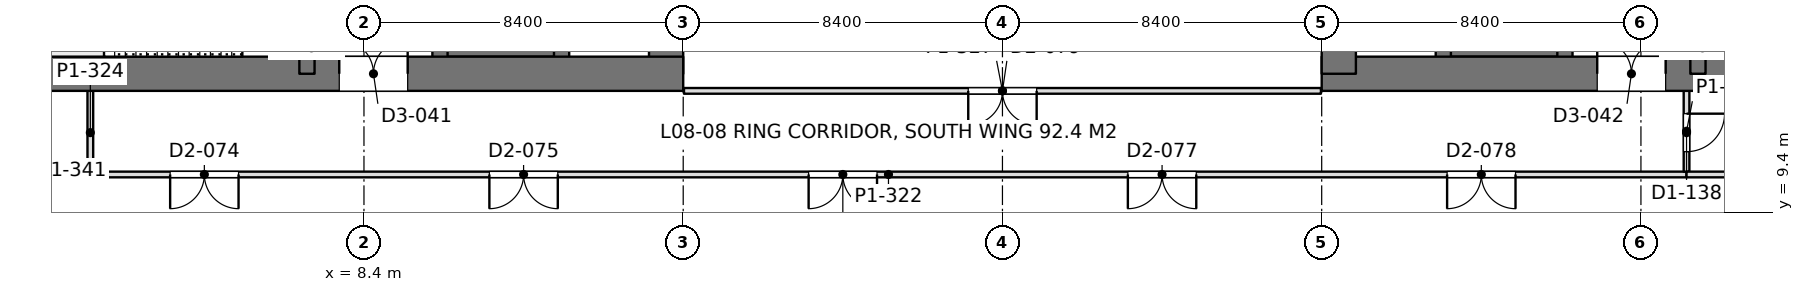
"""IFC4 building model, lengths in metres.
Left out: names, types, materials, properties, quantities, classifications, styles, units other than length and angle.
Written with IfcOpenShell. Run it as: python <this file> out.ifc"""

import sys

from ifc_helpers import new_model, si_unit, direction, frame, frame_2d, origin, place, context, subcontext, project, spatial, rectangle, extrude, element, fill, save


model = new_model("IFC4")
c1 = context("Model", 3, precision=1e-05, world=origin(), true_north=direction((0.0, 1.0)))
c2 = subcontext(c1, "Body", "Model", "MODEL_VIEW")
j1 = project(units=[si_unit("LENGTHUNIT", "METRE"), si_unit("PLANEANGLEUNIT", "RADIAN")], contexts=[c1])
p1 = place(None, origin())
s1 = spatial("IfcSite", under=j1, at=p1, CompositionType="ELEMENT")
p2 = place(p1, origin())
s2 = spatial("IfcBuilding", under=s1, at=p2, CompositionType="ELEMENT")
p3 = place(p2, frame((0.0, 0.0, 36.9)))
s3 = spatial("IfcBuildingStorey", under=s2, at=p3, CompositionType="ELEMENT", Elevation=36.9)
p4 = place(p3, frame((-1.2, 13.05, 0.0), z_axis=(0.0, 0.0, 1.0), x_axis=(1.0, 0.0, 0.0)))
e1 = element("IfcWall", 1, at=p4, inside=s3, PredefinedType="SHEAR", context=c2, shape_type="SweptSolid", body=[
    extrude(rectangle(XDim=18.0, YDim=0.9, at=frame_2d((9.0, 0.0))), origin(), (0.0, 0.0, 1.0), 4.5),
])
p5 = place(p4, frame((8.95, 0.0, 0.0)))
e2 = element("IfcOpeningElement", 2, at=p5, cuts=e1, PredefinedType="OPENING", context=c2, shape_type="SweptSolid", body=[
    extrude(rectangle(XDim=1.8, YDim=2.4, at=frame_2d((0.9, 1.2))), frame((0.0, 0.46, 0.0), z_axis=(0.0, -1.0, 0.0), x_axis=(1.0, 0.0, 0.0)), (0.0, 0.0, 1.0), 0.92),
])
p6 = place(p3, frame((16.35, 13.05, 0.0), z_axis=(0.0, 0.0, 1.0), x_axis=(0.0, 1.0, 0.0)))
e3 = element("IfcWall", 3, at=p6, inside=s3, PredefinedType="SHEAR", context=c2, shape_type="SweptSolid", body=[
    extrude(rectangle(XDim=24.3, YDim=0.9, at=frame_2d((12.15, 0.0))), origin(), (0.0, 0.0, 1.0), 4.5),
])
p7 = place(p3, frame((6.9, 13.05, 0.0), z_axis=(0.0, 0.0, 1.0), x_axis=(0.0, 1.0, 0.0)))
e4 = element("IfcWall", 4, at=p7, inside=s3, PredefinedType="SHEAR", context=c2, shape_type="SweptSolid", body=[
    extrude(rectangle(XDim=24.3, YDim=0.4, at=frame_2d((12.15, 0.0))), origin(), (0.0, 0.0, 1.0), 4.5),
])
p8 = place(p7, frame((1.3, 0.0, 0.0)))
e5 = element("IfcOpeningElement", 5, at=p8, cuts=e4, PredefinedType="OPENING", context=c2, shape_type="SweptSolid", body=[
    extrude(rectangle(XDim=1.0, YDim=2.2, at=frame_2d((0.5, 1.1))), frame((0.0, 0.21, 0.0), z_axis=(0.0, -1.0, 0.0), x_axis=(1.0, 0.0, 0.0)), (0.0, 0.0, 1.0), 0.42),
])
p9 = place(p7, frame((22.0, 0.0, 0.0)))
e6 = element("IfcOpeningElement", 6, at=p9, cuts=e4, PredefinedType="OPENING", context=c2, shape_type="SweptSolid", body=[
    extrude(rectangle(XDim=1.0, YDim=2.2, at=frame_2d((0.5, 1.1))), frame((0.0, 0.21, 0.0), z_axis=(0.0, -1.0, 0.0), x_axis=(1.0, 0.0, 0.0)), (0.0, 0.0, 1.0), 0.42),
])
p10 = place(p7, frame((5.55, 0.0, 0.0)))
e7 = element("IfcOpeningElement", 7, at=p10, cuts=e4, PredefinedType="OPENING", context=c2, shape_type="SweptSolid", body=[
    extrude(rectangle(XDim=1.0, YDim=2.2, at=frame_2d((0.5, 1.1))), frame((0.0, 0.21, 0.0), z_axis=(0.0, -1.0, 0.0), x_axis=(1.0, 0.0, 0.0)), (0.0, 0.0, 1.0), 0.42),
])
p11 = place(p7, frame((9.55, 0.0, 0.0)))
e8 = element("IfcOpeningElement", 8, at=p11, cuts=e4, PredefinedType="OPENING", context=c2, shape_type="SweptSolid", body=[
    extrude(rectangle(XDim=1.0, YDim=2.2, at=frame_2d((0.5, 1.1))), frame((0.0, 0.21, 0.0), z_axis=(0.0, -1.0, 0.0), x_axis=(1.0, 0.0, 0.0)), (0.0, 0.0, 1.0), 0.42),
])
p12 = place(p7, frame((12.8, 0.0, 0.0)))
e9 = element("IfcOpeningElement", 9, at=p12, cuts=e4, PredefinedType="OPENING", context=c2, shape_type="SweptSolid", body=[
    extrude(rectangle(XDim=1.1, YDim=2.2, at=frame_2d((0.55, 1.1))), frame((0.0, 0.21, 0.0), z_axis=(0.0, -1.0, 0.0), x_axis=(1.0, 0.0, 0.0)), (0.0, 0.0, 1.0), 0.42),
])
p13 = place(p7, frame((15.538, 0.0, 0.0)))
e10 = element("IfcOpeningElement", 10, at=p13, cuts=e4, PredefinedType="OPENING", context=c2, shape_type="SweptSolid", body=[
    extrude(rectangle(XDim=1.1, YDim=2.2, at=frame_2d((0.55, 1.1))), frame((0.0, 0.21, 0.0), z_axis=(0.0, -1.0, 0.0), x_axis=(1.0, 0.0, 0.0)), (0.0, 0.0, 1.0), 0.42),
])
p14 = place(p7, frame((18.262, 0.0, 0.0)))
e11 = element("IfcOpeningElement", 11, at=p14, cuts=e4, PredefinedType="OPENING", context=c2, shape_type="SweptSolid", body=[
    extrude(rectangle(XDim=1.1, YDim=2.2, at=frame_2d((0.55, 1.1))), frame((0.0, 0.21, 0.0), z_axis=(0.0, -1.0, 0.0), x_axis=(1.0, 0.0, 0.0)), (0.0, 0.0, 1.0), 0.42),
])
p15 = place(p3, frame((10.4, 13.05, 0.0), z_axis=(0.0, 0.0, 1.0), x_axis=(0.0, 1.0, 0.0)))
e12 = element("IfcWall", 12, at=p15, inside=s3, PredefinedType="SHEAR", context=c2, shape_type="SweptSolid", body=[
    extrude(rectangle(XDim=24.3, YDim=0.4, at=frame_2d((12.15, 0.0))), origin(), (0.0, 0.0, 1.0), 4.5),
])
p16 = place(p15, frame((1.5, 0.0, 0.0)))
e13 = element("IfcOpeningElement", 13, at=p16, cuts=e12, PredefinedType="OPENING", context=c2, shape_type="SweptSolid", body=[
    extrude(rectangle(XDim=1.1, YDim=2.2, at=frame_2d((0.55, 1.1))), frame((0.0, 0.21, 0.0), z_axis=(0.0, -1.0, 0.0), x_axis=(1.0, 0.0, 0.0)), (0.0, 0.0, 1.0), 0.42),
])
p17 = place(p15, frame((4.35, 0.0, 0.0)))
e14 = element("IfcOpeningElement", 14, at=p17, cuts=e12, PredefinedType="OPENING", context=c2, shape_type="SweptSolid", body=[
    extrude(rectangle(XDim=1.1, YDim=2.2, at=frame_2d((0.55, 1.1))), frame((0.0, 0.21, 0.0), z_axis=(0.0, -1.0, 0.0), x_axis=(1.0, 0.0, 0.0)), (0.0, 0.0, 1.0), 0.42),
])
p18 = place(p15, frame((7.2, 0.0, 0.0)))
e15 = element("IfcOpeningElement", 15, at=p18, cuts=e12, PredefinedType="OPENING", context=c2, shape_type="SweptSolid", body=[
    extrude(rectangle(XDim=1.1, YDim=2.2, at=frame_2d((0.55, 1.1))), frame((0.0, 0.21, 0.0), z_axis=(0.0, -1.0, 0.0), x_axis=(1.0, 0.0, 0.0)), (0.0, 0.0, 1.0), 0.42),
])
p19 = place(p15, frame((21.45, 0.0, 0.0)))
e16 = element("IfcOpeningElement", 16, at=p19, cuts=e12, PredefinedType="OPENING", context=c2, shape_type="SweptSolid", body=[
    extrude(rectangle(XDim=1.1, YDim=2.2, at=frame_2d((0.55, 1.1))), frame((0.0, 0.21, 0.0), z_axis=(0.0, -1.0, 0.0), x_axis=(1.0, 0.0, 0.0)), (0.0, 0.0, 1.0), 0.42),
])
p20 = place(p3, frame((13.6, 13.05, 0.0), z_axis=(0.0, 0.0, 1.0), x_axis=(0.0, 1.0, 0.0)))
e17 = element("IfcWall", 17, at=p20, inside=s3, PredefinedType="SHEAR", context=c2, shape_type="SweptSolid", body=[
    extrude(rectangle(XDim=24.3, YDim=0.4, at=frame_2d((12.15, 0.0))), origin(), (0.0, 0.0, 1.0), 4.5),
])
p21 = place(p3, frame((10.4, 13.65, 0.0), z_axis=(0.0, 0.0, 1.0), x_axis=(1.0, 0.0, 0.0)))
e18 = element("IfcWall", 18, at=p21, inside=s3, PredefinedType="SHEAR", context=c2, shape_type="SweptSolid", body=[
    extrude(rectangle(XDim=3.2, YDim=0.3, at=frame_2d((1.6, 0.0))), origin(), (0.0, 0.0, 1.0), 4.5),
])
p22 = place(p3, frame((33.6, 13.05, 0.0), z_axis=(0.0, 0.0, 1.0), x_axis=(1.0, 0.0, 0.0)))
e19 = element("IfcWall", 19, at=p22, inside=s3, PredefinedType="SHEAR", context=c2, shape_type="SweptSolid", body=[
    extrude(rectangle(XDim=18.0, YDim=0.9, at=frame_2d((9.0, 0.0))), origin(), (0.0, 0.0, 1.0), 4.5),
])
p23 = place(p22, frame((7.25, 0.0, 0.0)))
e20 = element("IfcOpeningElement", 20, at=p23, cuts=e19, PredefinedType="OPENING", context=c2, shape_type="SweptSolid", body=[
    extrude(rectangle(XDim=1.8, YDim=2.4, at=frame_2d((0.9, 1.2))), frame((0.0, 0.46, 0.0), z_axis=(0.0, -1.0, 0.0), x_axis=(1.0, 0.0, 0.0)), (0.0, 0.0, 1.0), 0.92),
])
p24 = place(p3, frame((34.05, 13.05, 0.0), z_axis=(0.0, 0.0, 1.0), x_axis=(0.0, 1.0, 0.0)))
e21 = element("IfcWall", 21, at=p24, inside=s3, PredefinedType="SHEAR", context=c2, shape_type="SweptSolid", body=[
    extrude(rectangle(XDim=24.3, YDim=0.9, at=frame_2d((12.15, 0.0))), origin(), (0.0, 0.0, 1.0), 4.5),
])
p25 = place(p3, frame((43.5, 13.05, 0.0), z_axis=(0.0, 0.0, 1.0), x_axis=(0.0, 1.0, 0.0)))
e22 = element("IfcWall", 22, at=p25, inside=s3, PredefinedType="SHEAR", context=c2, shape_type="SweptSolid", body=[
    extrude(rectangle(XDim=24.3, YDim=0.4, at=frame_2d((12.15, 0.0))), origin(), (0.0, 0.0, 1.0), 4.5),
])
p26 = place(p25, frame((1.3, 0.0, 0.0)))
e23 = element("IfcOpeningElement", 23, at=p26, cuts=e22, PredefinedType="OPENING", context=c2, shape_type="SweptSolid", body=[
    extrude(rectangle(XDim=1.0, YDim=2.2, at=frame_2d((0.5, 1.1))), frame((0.0, 0.21, 0.0), z_axis=(0.0, -1.0, 0.0), x_axis=(1.0, 0.0, 0.0)), (0.0, 0.0, 1.0), 0.42),
])
p27 = place(p25, frame((22.0, 0.0, 0.0)))
e24 = element("IfcOpeningElement", 24, at=p27, cuts=e22, PredefinedType="OPENING", context=c2, shape_type="SweptSolid", body=[
    extrude(rectangle(XDim=1.0, YDim=2.2, at=frame_2d((0.5, 1.1))), frame((0.0, 0.21, 0.0), z_axis=(0.0, -1.0, 0.0), x_axis=(1.0, 0.0, 0.0)), (0.0, 0.0, 1.0), 0.42),
])
p28 = place(p25, frame((5.55, 0.0, 0.0)))
e25 = element("IfcOpeningElement", 25, at=p28, cuts=e22, PredefinedType="OPENING", context=c2, shape_type="SweptSolid", body=[
    extrude(rectangle(XDim=1.0, YDim=2.2, at=frame_2d((0.5, 1.1))), frame((0.0, 0.21, 0.0), z_axis=(0.0, -1.0, 0.0), x_axis=(1.0, 0.0, 0.0)), (0.0, 0.0, 1.0), 0.42),
])
p29 = place(p25, frame((9.55, 0.0, 0.0)))
e26 = element("IfcOpeningElement", 26, at=p29, cuts=e22, PredefinedType="OPENING", context=c2, shape_type="SweptSolid", body=[
    extrude(rectangle(XDim=1.0, YDim=2.2, at=frame_2d((0.5, 1.1))), frame((0.0, 0.21, 0.0), z_axis=(0.0, -1.0, 0.0), x_axis=(1.0, 0.0, 0.0)), (0.0, 0.0, 1.0), 0.42),
])
p30 = place(p25, frame((12.8, 0.0, 0.0)))
e27 = element("IfcOpeningElement", 27, at=p30, cuts=e22, PredefinedType="OPENING", context=c2, shape_type="SweptSolid", body=[
    extrude(rectangle(XDim=1.1, YDim=2.2, at=frame_2d((0.55, 1.1))), frame((0.0, 0.21, 0.0), z_axis=(0.0, -1.0, 0.0), x_axis=(1.0, 0.0, 0.0)), (0.0, 0.0, 1.0), 0.42),
])
p31 = place(p25, frame((15.538, 0.0, 0.0)))
e28 = element("IfcOpeningElement", 28, at=p31, cuts=e22, PredefinedType="OPENING", context=c2, shape_type="SweptSolid", body=[
    extrude(rectangle(XDim=1.1, YDim=2.2, at=frame_2d((0.55, 1.1))), frame((0.0, 0.21, 0.0), z_axis=(0.0, -1.0, 0.0), x_axis=(1.0, 0.0, 0.0)), (0.0, 0.0, 1.0), 0.42),
])
p32 = place(p25, frame((18.262, 0.0, 0.0)))
e29 = element("IfcOpeningElement", 29, at=p32, cuts=e22, PredefinedType="OPENING", context=c2, shape_type="SweptSolid", body=[
    extrude(rectangle(XDim=1.1, YDim=2.2, at=frame_2d((0.55, 1.1))), frame((0.0, 0.21, 0.0), z_axis=(0.0, -1.0, 0.0), x_axis=(1.0, 0.0, 0.0)), (0.0, 0.0, 1.0), 0.42),
])
p33 = place(p3, frame((40.0, 13.05, 0.0), z_axis=(0.0, 0.0, 1.0), x_axis=(0.0, 1.0, 0.0)))
e30 = element("IfcWall", 30, at=p33, inside=s3, PredefinedType="SHEAR", context=c2, shape_type="SweptSolid", body=[
    extrude(rectangle(XDim=24.3, YDim=0.4, at=frame_2d((12.15, 0.0))), origin(), (0.0, 0.0, 1.0), 4.5),
])
p34 = place(p33, frame((1.5, 0.0, 0.0)))
e31 = element("IfcOpeningElement", 31, at=p34, cuts=e30, PredefinedType="OPENING", context=c2, shape_type="SweptSolid", body=[
    extrude(rectangle(XDim=1.1, YDim=2.2, at=frame_2d((0.55, 1.1))), frame((0.0, 0.21, 0.0), z_axis=(0.0, -1.0, 0.0), x_axis=(1.0, 0.0, 0.0)), (0.0, 0.0, 1.0), 0.42),
])
p35 = place(p33, frame((4.35, 0.0, 0.0)))
e32 = element("IfcOpeningElement", 32, at=p35, cuts=e30, PredefinedType="OPENING", context=c2, shape_type="SweptSolid", body=[
    extrude(rectangle(XDim=1.1, YDim=2.2, at=frame_2d((0.55, 1.1))), frame((0.0, 0.21, 0.0), z_axis=(0.0, -1.0, 0.0), x_axis=(1.0, 0.0, 0.0)), (0.0, 0.0, 1.0), 0.42),
])
p36 = place(p33, frame((7.2, 0.0, 0.0)))
e33 = element("IfcOpeningElement", 33, at=p36, cuts=e30, PredefinedType="OPENING", context=c2, shape_type="SweptSolid", body=[
    extrude(rectangle(XDim=1.1, YDim=2.2, at=frame_2d((0.55, 1.1))), frame((0.0, 0.21, 0.0), z_axis=(0.0, -1.0, 0.0), x_axis=(1.0, 0.0, 0.0)), (0.0, 0.0, 1.0), 0.42),
])
p37 = place(p33, frame((21.45, 0.0, 0.0)))
e34 = element("IfcOpeningElement", 34, at=p37, cuts=e30, PredefinedType="OPENING", context=c2, shape_type="SweptSolid", body=[
    extrude(rectangle(XDim=1.1, YDim=2.2, at=frame_2d((0.55, 1.1))), frame((0.0, 0.21, 0.0), z_axis=(0.0, -1.0, 0.0), x_axis=(1.0, 0.0, 0.0)), (0.0, 0.0, 1.0), 0.42),
])
p38 = place(p3, frame((36.8, 13.05, 0.0), z_axis=(0.0, 0.0, 1.0), x_axis=(0.0, 1.0, 0.0)))
e35 = element("IfcWall", 35, at=p38, inside=s3, PredefinedType="SHEAR", context=c2, shape_type="SweptSolid", body=[
    extrude(rectangle(XDim=24.3, YDim=0.4, at=frame_2d((12.15, 0.0))), origin(), (0.0, 0.0, 1.0), 4.5),
])
p39 = place(p3, frame((40.0, 13.65, 0.0), z_axis=(0.0, 0.0, 1.0), x_axis=(-1.0, 0.0, 0.0)))
e36 = element("IfcWall", 36, at=p39, inside=s3, PredefinedType="SHEAR", context=c2, shape_type="SweptSolid", body=[
    extrude(rectangle(XDim=3.2, YDim=0.3, at=frame_2d((1.6, 0.0))), origin(), (0.0, 0.0, 1.0), 4.5),
])
p40 = place(p3, frame((1.2, 10.4, 0.0), z_axis=(0.0, 0.0, 1.0), x_axis=(1.0, 0.0, 0.0)))
e37 = element("IfcWall", 37, at=p40, inside=s3, PredefinedType="PARTITIONING", context=c2, shape_type="SweptSolid", body=[
    extrude(rectangle(XDim=42.002, YDim=0.15, at=frame_2d((21.001, 0.0))), origin(), (0.0, 0.0, 1.0), 3.74),
])
p41 = place(p40, frame((2.1, 0.0, 0.0)))
e38 = element("IfcOpeningElement", 38, at=p41, cuts=e37, PredefinedType="OPENING", context=c2, shape_type="SweptSolid", body=[
    extrude(rectangle(XDim=1.8, YDim=2.2, at=frame_2d((0.9, 1.1))), frame((0.0, 0.085, 0.0), z_axis=(0.0, -1.0, 0.0), x_axis=(1.0, 0.0, 0.0)), (0.0, 0.0, 1.0), 0.17),
])
p42 = place(p40, frame((10.5, 0.0, 0.0)))
e39 = element("IfcOpeningElement", 39, at=p42, cuts=e37, PredefinedType="OPENING", context=c2, shape_type="SweptSolid", body=[
    extrude(rectangle(XDim=1.8, YDim=2.2, at=frame_2d((0.9, 1.1))), frame((0.0, 0.085, 0.0), z_axis=(0.0, -1.0, 0.0), x_axis=(1.0, 0.0, 0.0)), (0.0, 0.0, 1.0), 0.17),
])
p43 = place(p40, frame((18.9, 0.0, 0.0)))
e40 = element("IfcOpeningElement", 40, at=p43, cuts=e37, PredefinedType="OPENING", context=c2, shape_type="SweptSolid", body=[
    extrude(rectangle(XDim=1.8, YDim=2.2, at=frame_2d((0.9, 1.1))), frame((0.0, 0.085, 0.0), z_axis=(0.0, -1.0, 0.0), x_axis=(1.0, 0.0, 0.0)), (0.0, 0.0, 1.0), 0.17),
])
p44 = place(p40, frame((27.3, 0.0, 0.0)))
e41 = element("IfcOpeningElement", 41, at=p44, cuts=e37, PredefinedType="OPENING", context=c2, shape_type="SweptSolid", body=[
    extrude(rectangle(XDim=1.8, YDim=2.2, at=frame_2d((0.9, 1.1))), frame((0.0, 0.085, 0.0), z_axis=(0.0, -1.0, 0.0), x_axis=(1.0, 0.0, 0.0)), (0.0, 0.0, 1.0), 0.17),
])
p45 = place(p40, frame((35.7, 0.0, 0.0)))
e42 = element("IfcOpeningElement", 42, at=p45, cuts=e37, PredefinedType="OPENING", context=c2, shape_type="SweptSolid", body=[
    extrude(rectangle(XDim=1.8, YDim=2.2, at=frame_2d((0.9, 1.1))), frame((0.0, 0.085, 0.0), z_axis=(0.0, -1.0, 0.0), x_axis=(1.0, 0.0, 0.0)), (0.0, 0.0, 1.0), 0.17),
])
p46 = place(p3, frame((1.2, 10.4, 0.0), z_axis=(0.0, 0.0, 1.0), x_axis=(0.0, 1.0, 0.0)))
e43 = element("IfcWall", 43, at=p46, inside=s3, PredefinedType="PARTITIONING", context=c2, shape_type="SweptSolid", body=[
    extrude(rectangle(XDim=2.202, YDim=0.15, at=frame_2d((1.101, 0.0))), origin(), (0.0, 0.0, 1.0), 4.34),
])
p47 = place(p3, frame((43.2, 10.474, 0.0), z_axis=(0.0, 0.0, 1.0), x_axis=(0.0, 1.0, 0.0)))
e44 = element("IfcWall", 44, at=p47, inside=s3, PredefinedType="PARTITIONING", context=c2, shape_type="SweptSolid", body=[
    extrude(rectangle(XDim=2.128, YDim=0.15, at=frame_2d((1.064, 0.0))), origin(), (0.0, 0.0, 1.0), 4.34),
])
p48 = place(p47, frame((0.526, 0.0, 0.0)))
e45 = element("IfcOpeningElement", 45, at=p48, cuts=e44, PredefinedType="OPENING", context=c2, shape_type="SweptSolid", body=[
    extrude(rectangle(XDim=1.0, YDim=2.2, at=frame_2d((0.5, 1.1))), frame((0.0, 0.085, 0.0), z_axis=(0.0, -1.0, 0.0), x_axis=(1.0, 0.0, 0.0)), (0.0, 0.0, 1.0), 0.17),
])
p49 = place(p3, frame((43.198, 10.4, 0.0), z_axis=(0.0, 0.0, 1.0), x_axis=(1.0, 0.0, 0.0)))
e46 = element("IfcWall", 46, at=p49, inside=s3, PredefinedType="PARTITIONING", context=c2, shape_type="SweptSolid", body=[
    extrude(rectangle(XDim=6.002, YDim=0.15, at=frame_2d((3.001, 0.0))), origin(), (0.0, 0.0, 1.0), 4.34),
])
p50 = place(p3, frame((16.82, 12.6, 0.0), z_axis=(0.0, 0.0, 1.0), x_axis=(1.0, 0.0, 0.0)))
e47 = element("IfcWall", 47, at=p50, inside=s3, PredefinedType="PARTITIONING", context=c2, shape_type="SweptSolid", body=[
    extrude(rectangle(XDim=16.76, YDim=0.15, at=frame_2d((8.38, 0.0))), origin(), (0.0, 0.0, 1.0), 3.74),
])
p51 = place(p50, frame((7.48, 0.0, 0.0)))
e48 = element("IfcOpeningElement", 48, at=p51, cuts=e47, PredefinedType="OPENING", context=c2, shape_type="SweptSolid", body=[
    extrude(rectangle(XDim=1.8, YDim=2.2, at=frame_2d((0.9, 1.1))), frame((0.0, 0.085, 0.0), z_axis=(0.0, -1.0, 0.0), x_axis=(1.0, 0.0, 0.0)), (0.0, 0.0, 1.0), 0.17),
])
p52 = place(p5, origin())
e49 = element("IfcDoor", 49, at=p52, inside=s3, OperationType="DOUBLE_DOOR_SINGLE_SWING", PredefinedType="DOOR", context=c2, shape_type="SweptSolid", body=[
    extrude(rectangle(XDim=1.8, YDim=2.4, at=frame_2d((0.9, 1.2))), frame((0.0, 0.025, 0.0), z_axis=(0.0, -1.0, 0.0), x_axis=(1.0, 0.0, 0.0)), (0.0, 0.0, 1.0), 0.05),
])
fill(e2, e49)
p53 = place(p23, origin())
e50 = element("IfcDoor", 50, at=p53, inside=s3, OperationType="DOUBLE_DOOR_SINGLE_SWING", PredefinedType="DOOR", context=c2, shape_type="SweptSolid", body=[
    extrude(rectangle(XDim=1.8, YDim=2.4, at=frame_2d((0.9, 1.2))), frame((0.0, 0.025, 0.0), z_axis=(0.0, -1.0, 0.0), x_axis=(1.0, 0.0, 0.0)), (0.0, 0.0, 1.0), 0.05),
])
fill(e20, e50)
p54 = place(p41, frame((1.8, 0.0, 0.0), z_axis=(0.0, 0.0, 1.0), x_axis=(-1.0, 0.0, 0.0)))
e51 = element("IfcDoor", 51, at=p54, inside=s3, OperationType="DOUBLE_DOOR_SINGLE_SWING", PredefinedType="DOOR", context=c2, shape_type="SweptSolid", body=[
    extrude(rectangle(XDim=1.8, YDim=2.2, at=frame_2d((0.9, 1.1))), frame((0.0, 0.025, 0.0), z_axis=(0.0, -1.0, 0.0), x_axis=(1.0, 0.0, 0.0)), (0.0, 0.0, 1.0), 0.05),
])
fill(e38, e51)
p55 = place(p42, frame((1.8, 0.0, 0.0), z_axis=(0.0, 0.0, 1.0), x_axis=(-1.0, 0.0, 0.0)))
e52 = element("IfcDoor", 52, at=p55, inside=s3, OperationType="DOUBLE_DOOR_SINGLE_SWING", PredefinedType="DOOR", context=c2, shape_type="SweptSolid", body=[
    extrude(rectangle(XDim=1.8, YDim=2.2, at=frame_2d((0.9, 1.1))), frame((0.0, 0.025, 0.0), z_axis=(0.0, -1.0, 0.0), x_axis=(1.0, 0.0, 0.0)), (0.0, 0.0, 1.0), 0.05),
])
fill(e39, e52)
p56 = place(p43, frame((1.8, 0.0, 0.0), z_axis=(0.0, 0.0, 1.0), x_axis=(-1.0, 0.0, 0.0)))
e53 = element("IfcDoor", 53, at=p56, inside=s3, OperationType="DOUBLE_DOOR_SINGLE_SWING", PredefinedType="DOOR", context=c2, shape_type="SweptSolid", body=[
    extrude(rectangle(XDim=1.8, YDim=2.2, at=frame_2d((0.9, 1.1))), frame((0.0, 0.025, 0.0), z_axis=(0.0, -1.0, 0.0), x_axis=(1.0, 0.0, 0.0)), (0.0, 0.0, 1.0), 0.05),
])
fill(e40, e53)
p57 = place(p44, frame((1.8, 0.0, 0.0), z_axis=(0.0, 0.0, 1.0), x_axis=(-1.0, 0.0, 0.0)))
e54 = element("IfcDoor", 54, at=p57, inside=s3, OperationType="DOUBLE_DOOR_SINGLE_SWING", PredefinedType="DOOR", context=c2, shape_type="SweptSolid", body=[
    extrude(rectangle(XDim=1.8, YDim=2.2, at=frame_2d((0.9, 1.1))), frame((0.0, 0.025, 0.0), z_axis=(0.0, -1.0, 0.0), x_axis=(1.0, 0.0, 0.0)), (0.0, 0.0, 1.0), 0.05),
])
fill(e41, e54)
p58 = place(p45, frame((1.8, 0.0, 0.0), z_axis=(0.0, 0.0, 1.0), x_axis=(-1.0, 0.0, 0.0)))
e55 = element("IfcDoor", 55, at=p58, inside=s3, OperationType="DOUBLE_DOOR_SINGLE_SWING", PredefinedType="DOOR", context=c2, shape_type="SweptSolid", body=[
    extrude(rectangle(XDim=1.8, YDim=2.2, at=frame_2d((0.9, 1.1))), frame((0.0, 0.025, 0.0), z_axis=(0.0, -1.0, 0.0), x_axis=(1.0, 0.0, 0.0)), (0.0, 0.0, 1.0), 0.05),
])
fill(e42, e55)
p59 = place(p48, frame((1.0, 0.0, 0.0), z_axis=(0.0, 0.0, 1.0), x_axis=(-1.0, 0.0, 0.0)))
e56 = element("IfcDoor", 56, at=p59, inside=s3, OperationType="SINGLE_SWING_LEFT", PredefinedType="DOOR", context=c2, shape_type="SweptSolid", body=[
    extrude(rectangle(XDim=1.0, YDim=2.2, at=frame_2d((0.5, 1.1))), frame((0.0, 0.025, 0.0), z_axis=(0.0, -1.0, 0.0), x_axis=(1.0, 0.0, 0.0)), (0.0, 0.0, 1.0), 0.05),
])
fill(e45, e56)
p60 = place(p51, frame((1.8, 0.0, 0.0), z_axis=(0.0, 0.0, 1.0), x_axis=(-1.0, 0.0, 0.0)))
e57 = element("IfcDoor", 57, at=p60, inside=s3, OperationType="DOUBLE_DOOR_SINGLE_SWING", PredefinedType="DOOR", context=c2, shape_type="SweptSolid", body=[
    extrude(rectangle(XDim=1.8, YDim=2.2, at=frame_2d((0.9, 1.1))), frame((0.0, 0.025, 0.0), z_axis=(0.0, -1.0, 0.0), x_axis=(1.0, 0.0, 0.0)), (0.0, 0.0, 1.0), 0.05),
])
fill(e48, e57)
save(model, sys.argv[1])
